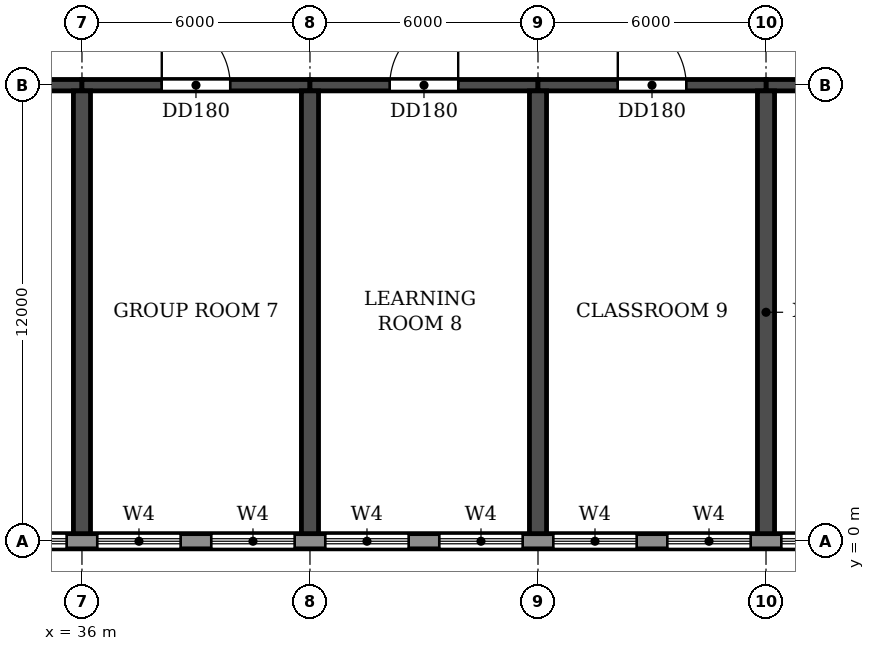
"""IFC4 building model, lengths in metres.
Left out: names, types, materials, properties, quantities, classifications, styles, units other than length and angle.
Written with IfcOpenShell. Run it as: python <this file> out.ifc"""

import sys

from ifc_helpers import new_model, si_unit, direction, frame, frame_2d, origin, place, context, subcontext, project, spatial, rectangle, extrude, element, fill, save


model = new_model("IFC4")
c1 = context("Model", 3, precision=1e-05, world=origin(), true_north=direction((0.0, 1.0)))
c2 = subcontext(c1, "Body", "Model", "MODEL_VIEW")
j1 = project(units=[si_unit("LENGTHUNIT", "METRE"), si_unit("PLANEANGLEUNIT", "RADIAN")], contexts=[c1])
p1 = place(None, origin())
s1 = spatial("IfcSite", under=j1, at=p1, CompositionType="ELEMENT")
p2 = place(p1, origin())
s2 = spatial("IfcBuilding", under=s1, at=p2, CompositionType="ELEMENT")
p3 = place(p2, frame((0.0, 0.0, 15.0)))
s3 = spatial("IfcBuildingStorey", under=s2, at=p3, CompositionType="ELEMENT", Elevation=15.0)
for number, where, z_axis, x_axis in (
    (1, (36.0, 0.2, 0.0), (0.0, 0.0, 1.0), (0.0, 1.0, 0.0)),
    (2, (42.0, 0.2, 0.0), (0.0, 0.0, 1.0), (0.0, 1.0, 0.0)),
    (3, (48.0, 0.2, 0.0), (0.0, 0.0, 1.0), (0.0, 1.0, 0.0)),
    (4, (54.0, 0.2, 0.0), (0.0, 0.0, 1.0), (0.0, 1.0, 0.0)),
):
    element("IfcWall", number, at=place(p3, frame(where, z_axis=z_axis, x_axis=x_axis)), inside=s3, PredefinedType="SHEAR", context=c2, shape_type="SweptSolid", body=[
        extrude(rectangle(XDim=11.65, YDim=0.45, at=frame_2d((5.825, 0.0))), origin(), (0.0, 0.0, 1.0), 3.92),
    ])
p4 = place(p3, frame((30.0, 12.0, 0.0), z_axis=(0.0, 0.0, 1.0), x_axis=(1.0, 0.0, 0.0)))
e5 = element("IfcWall", 5, at=p4, inside=s3, PredefinedType="SHEAR", context=c2, shape_type="SweptSolid", body=[
    extrude(rectangle(XDim=6.0, YDim=0.3, at=frame_2d((3.0, 0.0))), origin(), (0.0, 0.0, 1.0), 3.32),
])
p5 = place(p4, frame((2.1, 0.0, 0.0)))
e6 = element("IfcOpeningElement", 6, at=p5, cuts=e5, PredefinedType="OPENING", context=c2, shape_type="SweptSolid", body=[
    extrude(rectangle(XDim=1.8, YDim=2.1, at=frame_2d((0.9, 1.05))), frame((0.0, 0.16, 0.0), z_axis=(0.0, -1.0, 0.0), x_axis=(1.0, 0.0, 0.0)), (0.0, 0.0, 1.0), 0.32),
])
p6 = place(p3, frame((36.0, 12.0, 0.0), z_axis=(0.0, 0.0, 1.0), x_axis=(1.0, 0.0, 0.0)))
e7 = element("IfcWall", 7, at=p6, inside=s3, PredefinedType="SHEAR", context=c2, shape_type="SweptSolid", body=[
    extrude(rectangle(XDim=6.0, YDim=0.3, at=frame_2d((3.0, 0.0))), origin(), (0.0, 0.0, 1.0), 3.32),
])
p7 = place(p6, frame((2.1, 0.0, 0.0)))
e8 = element("IfcOpeningElement", 8, at=p7, cuts=e7, PredefinedType="OPENING", context=c2, shape_type="SweptSolid", body=[
    extrude(rectangle(XDim=1.8, YDim=2.1, at=frame_2d((0.9, 1.05))), frame((0.0, 0.16, 0.0), z_axis=(0.0, -1.0, 0.0), x_axis=(1.0, 0.0, 0.0)), (0.0, 0.0, 1.0), 0.32),
])
p8 = place(p3, frame((42.0, 12.0, 0.0), z_axis=(0.0, 0.0, 1.0), x_axis=(1.0, 0.0, 0.0)))
e9 = element("IfcWall", 9, at=p8, inside=s3, PredefinedType="SHEAR", context=c2, shape_type="SweptSolid", body=[
    extrude(rectangle(XDim=6.0, YDim=0.3, at=frame_2d((3.0, 0.0))), origin(), (0.0, 0.0, 1.0), 3.32),
])
p9 = place(p8, frame((2.1, 0.0, 0.0)))
e10 = element("IfcOpeningElement", 10, at=p9, cuts=e9, PredefinedType="OPENING", context=c2, shape_type="SweptSolid", body=[
    extrude(rectangle(XDim=1.8, YDim=2.1, at=frame_2d((0.9, 1.05))), frame((0.0, 0.16, 0.0), z_axis=(0.0, -1.0, 0.0), x_axis=(1.0, 0.0, 0.0)), (0.0, 0.0, 1.0), 0.32),
])
p10 = place(p3, frame((48.0, 12.0, 0.0), z_axis=(0.0, 0.0, 1.0), x_axis=(1.0, 0.0, 0.0)))
e11 = element("IfcWall", 11, at=p10, inside=s3, PredefinedType="SHEAR", context=c2, shape_type="SweptSolid", body=[
    extrude(rectangle(XDim=6.0, YDim=0.3, at=frame_2d((3.0, 0.0))), origin(), (0.0, 0.0, 1.0), 3.32),
])
p11 = place(p10, frame((2.1, 0.0, 0.0)))
e12 = element("IfcOpeningElement", 12, at=p11, cuts=e11, PredefinedType="OPENING", context=c2, shape_type="SweptSolid", body=[
    extrude(rectangle(XDim=1.8, YDim=2.1, at=frame_2d((0.9, 1.05))), frame((0.0, 0.16, 0.0), z_axis=(0.0, -1.0, 0.0), x_axis=(1.0, 0.0, 0.0)), (0.0, 0.0, 1.0), 0.32),
])
p12 = place(p3, frame((54.0, 12.0, 0.0), z_axis=(0.0, 0.0, 1.0), x_axis=(1.0, 0.0, 0.0)))
e13 = element("IfcWall", 13, at=p12, inside=s3, PredefinedType="SHEAR", context=c2, shape_type="SweptSolid", body=[
    extrude(rectangle(XDim=6.0, YDim=0.3, at=frame_2d((3.0, 0.0))), origin(), (0.0, 0.0, 1.0), 3.32),
])
p13 = place(p12, frame((2.1, 0.0, 0.0)))
e14 = element("IfcOpeningElement", 14, at=p13, cuts=e13, PredefinedType="OPENING", context=c2, shape_type="SweptSolid", body=[
    extrude(rectangle(XDim=1.8, YDim=2.1, at=frame_2d((0.9, 1.05))), frame((0.0, 0.16, 0.0), z_axis=(0.0, -1.0, 0.0), x_axis=(1.0, 0.0, 0.0)), (0.0, 0.0, 1.0), 0.32),
])
p14 = place(p3, frame((-3.0, 0.0, 0.0), z_axis=(0.0, 0.0, 1.0), x_axis=(1.0, 0.0, 0.0)))
e15 = element("IfcWall", 15, at=p14, inside=s3, PredefinedType="STANDARD", context=c2, shape_type="SweptSolid", body=[
    extrude(rectangle(XDim=108.0, YDim=0.4, at=frame_2d((54.0, 0.0))), origin(), (0.0, 0.0, 1.0), 3.92),
])
p15 = place(p14, frame((3.4, 0.0, 0.9)))
e16 = element("IfcOpeningElement", 16, at=p15, cuts=e15, PredefinedType="OPENING", context=c2, shape_type="SweptSolid", body=[
    extrude(rectangle(XDim=2.2, YDim=2.7, at=frame_2d((1.1, 1.35))), frame((0.0, 0.21, 0.0), z_axis=(0.0, -1.0, 0.0), x_axis=(1.0, 0.0, 0.0)), (0.0, 0.0, 1.0), 0.42),
])
p16 = place(p14, frame((6.4, 0.0, 0.9)))
e17 = element("IfcOpeningElement", 17, at=p16, cuts=e15, PredefinedType="OPENING", context=c2, shape_type="SweptSolid", body=[
    extrude(rectangle(XDim=2.2, YDim=2.7, at=frame_2d((1.1, 1.35))), frame((0.0, 0.21, 0.0), z_axis=(0.0, -1.0, 0.0), x_axis=(1.0, 0.0, 0.0)), (0.0, 0.0, 1.0), 0.42),
])
p17 = place(p14, frame((9.4, 0.0, 0.9)))
e18 = element("IfcOpeningElement", 18, at=p17, cuts=e15, PredefinedType="OPENING", context=c2, shape_type="SweptSolid", body=[
    extrude(rectangle(XDim=2.2, YDim=2.7, at=frame_2d((1.1, 1.35))), frame((0.0, 0.21, 0.0), z_axis=(0.0, -1.0, 0.0), x_axis=(1.0, 0.0, 0.0)), (0.0, 0.0, 1.0), 0.42),
])
p18 = place(p14, frame((12.4, 0.0, 0.9)))
e19 = element("IfcOpeningElement", 19, at=p18, cuts=e15, PredefinedType="OPENING", context=c2, shape_type="SweptSolid", body=[
    extrude(rectangle(XDim=2.2, YDim=2.7, at=frame_2d((1.1, 1.35))), frame((0.0, 0.21, 0.0), z_axis=(0.0, -1.0, 0.0), x_axis=(1.0, 0.0, 0.0)), (0.0, 0.0, 1.0), 0.42),
])
p19 = place(p14, frame((15.4, 0.0, 0.9)))
e20 = element("IfcOpeningElement", 20, at=p19, cuts=e15, PredefinedType="OPENING", context=c2, shape_type="SweptSolid", body=[
    extrude(rectangle(XDim=2.2, YDim=2.7, at=frame_2d((1.1, 1.35))), frame((0.0, 0.21, 0.0), z_axis=(0.0, -1.0, 0.0), x_axis=(1.0, 0.0, 0.0)), (0.0, 0.0, 1.0), 0.42),
])
p20 = place(p14, frame((18.4, 0.0, 0.9)))
e21 = element("IfcOpeningElement", 21, at=p20, cuts=e15, PredefinedType="OPENING", context=c2, shape_type="SweptSolid", body=[
    extrude(rectangle(XDim=2.2, YDim=2.7, at=frame_2d((1.1, 1.35))), frame((0.0, 0.21, 0.0), z_axis=(0.0, -1.0, 0.0), x_axis=(1.0, 0.0, 0.0)), (0.0, 0.0, 1.0), 0.42),
])
p21 = place(p14, frame((21.4, 0.0, 0.9)))
e22 = element("IfcOpeningElement", 22, at=p21, cuts=e15, PredefinedType="OPENING", context=c2, shape_type="SweptSolid", body=[
    extrude(rectangle(XDim=2.2, YDim=2.7, at=frame_2d((1.1, 1.35))), frame((0.0, 0.21, 0.0), z_axis=(0.0, -1.0, 0.0), x_axis=(1.0, 0.0, 0.0)), (0.0, 0.0, 1.0), 0.42),
])
p22 = place(p14, frame((24.4, 0.0, 0.9)))
e23 = element("IfcOpeningElement", 23, at=p22, cuts=e15, PredefinedType="OPENING", context=c2, shape_type="SweptSolid", body=[
    extrude(rectangle(XDim=2.2, YDim=2.7, at=frame_2d((1.1, 1.35))), frame((0.0, 0.21, 0.0), z_axis=(0.0, -1.0, 0.0), x_axis=(1.0, 0.0, 0.0)), (0.0, 0.0, 1.0), 0.42),
])
p23 = place(p14, frame((27.4, 0.0, 0.9)))
e24 = element("IfcOpeningElement", 24, at=p23, cuts=e15, PredefinedType="OPENING", context=c2, shape_type="SweptSolid", body=[
    extrude(rectangle(XDim=2.2, YDim=2.7, at=frame_2d((1.1, 1.35))), frame((0.0, 0.21, 0.0), z_axis=(0.0, -1.0, 0.0), x_axis=(1.0, 0.0, 0.0)), (0.0, 0.0, 1.0), 0.42),
])
p24 = place(p14, frame((30.4, 0.0, 0.9)))
e25 = element("IfcOpeningElement", 25, at=p24, cuts=e15, PredefinedType="OPENING", context=c2, shape_type="SweptSolid", body=[
    extrude(rectangle(XDim=2.2, YDim=2.7, at=frame_2d((1.1, 1.35))), frame((0.0, 0.21, 0.0), z_axis=(0.0, -1.0, 0.0), x_axis=(1.0, 0.0, 0.0)), (0.0, 0.0, 1.0), 0.42),
])
p25 = place(p14, frame((33.4, 0.0, 0.9)))
e26 = element("IfcOpeningElement", 26, at=p25, cuts=e15, PredefinedType="OPENING", context=c2, shape_type="SweptSolid", body=[
    extrude(rectangle(XDim=2.2, YDim=2.7, at=frame_2d((1.1, 1.35))), frame((0.0, 0.21, 0.0), z_axis=(0.0, -1.0, 0.0), x_axis=(1.0, 0.0, 0.0)), (0.0, 0.0, 1.0), 0.42),
])
p26 = place(p14, frame((36.4, 0.0, 0.9)))
e27 = element("IfcOpeningElement", 27, at=p26, cuts=e15, PredefinedType="OPENING", context=c2, shape_type="SweptSolid", body=[
    extrude(rectangle(XDim=2.2, YDim=2.7, at=frame_2d((1.1, 1.35))), frame((0.0, 0.21, 0.0), z_axis=(0.0, -1.0, 0.0), x_axis=(1.0, 0.0, 0.0)), (0.0, 0.0, 1.0), 0.42),
])
p27 = place(p14, frame((39.4, 0.0, 0.9)))
e28 = element("IfcOpeningElement", 28, at=p27, cuts=e15, PredefinedType="OPENING", context=c2, shape_type="SweptSolid", body=[
    extrude(rectangle(XDim=2.2, YDim=2.7, at=frame_2d((1.1, 1.35))), frame((0.0, 0.21, 0.0), z_axis=(0.0, -1.0, 0.0), x_axis=(1.0, 0.0, 0.0)), (0.0, 0.0, 1.0), 0.42),
])
p28 = place(p14, frame((42.4, 0.0, 0.9)))
e29 = element("IfcOpeningElement", 29, at=p28, cuts=e15, PredefinedType="OPENING", context=c2, shape_type="SweptSolid", body=[
    extrude(rectangle(XDim=2.2, YDim=2.7, at=frame_2d((1.1, 1.35))), frame((0.0, 0.21, 0.0), z_axis=(0.0, -1.0, 0.0), x_axis=(1.0, 0.0, 0.0)), (0.0, 0.0, 1.0), 0.42),
])
p29 = place(p14, frame((45.4, 0.0, 0.9)))
e30 = element("IfcOpeningElement", 30, at=p29, cuts=e15, PredefinedType="OPENING", context=c2, shape_type="SweptSolid", body=[
    extrude(rectangle(XDim=2.2, YDim=2.7, at=frame_2d((1.1, 1.35))), frame((0.0, 0.21, 0.0), z_axis=(0.0, -1.0, 0.0), x_axis=(1.0, 0.0, 0.0)), (0.0, 0.0, 1.0), 0.42),
])
p30 = place(p14, frame((48.4, 0.0, 0.9)))
e31 = element("IfcOpeningElement", 31, at=p30, cuts=e15, PredefinedType="OPENING", context=c2, shape_type="SweptSolid", body=[
    extrude(rectangle(XDim=2.2, YDim=2.7, at=frame_2d((1.1, 1.35))), frame((0.0, 0.21, 0.0), z_axis=(0.0, -1.0, 0.0), x_axis=(1.0, 0.0, 0.0)), (0.0, 0.0, 1.0), 0.42),
])
p31 = place(p14, frame((51.4, 0.0, 0.9)))
e32 = element("IfcOpeningElement", 32, at=p31, cuts=e15, PredefinedType="OPENING", context=c2, shape_type="SweptSolid", body=[
    extrude(rectangle(XDim=2.2, YDim=2.7, at=frame_2d((1.1, 1.35))), frame((0.0, 0.21, 0.0), z_axis=(0.0, -1.0, 0.0), x_axis=(1.0, 0.0, 0.0)), (0.0, 0.0, 1.0), 0.42),
])
p32 = place(p14, frame((54.4, 0.0, 0.9)))
e33 = element("IfcOpeningElement", 33, at=p32, cuts=e15, PredefinedType="OPENING", context=c2, shape_type="SweptSolid", body=[
    extrude(rectangle(XDim=2.2, YDim=2.7, at=frame_2d((1.1, 1.35))), frame((0.0, 0.21, 0.0), z_axis=(0.0, -1.0, 0.0), x_axis=(1.0, 0.0, 0.0)), (0.0, 0.0, 1.0), 0.42),
])
p33 = place(p14, frame((57.4, 0.0, 0.9)))
e34 = element("IfcOpeningElement", 34, at=p33, cuts=e15, PredefinedType="OPENING", context=c2, shape_type="SweptSolid", body=[
    extrude(rectangle(XDim=2.2, YDim=2.7, at=frame_2d((1.1, 1.35))), frame((0.0, 0.21, 0.0), z_axis=(0.0, -1.0, 0.0), x_axis=(1.0, 0.0, 0.0)), (0.0, 0.0, 1.0), 0.42),
])
p34 = place(p14, frame((60.4, 0.0, 0.9)))
e35 = element("IfcOpeningElement", 35, at=p34, cuts=e15, PredefinedType="OPENING", context=c2, shape_type="SweptSolid", body=[
    extrude(rectangle(XDim=2.2, YDim=2.7, at=frame_2d((1.1, 1.35))), frame((0.0, 0.21, 0.0), z_axis=(0.0, -1.0, 0.0), x_axis=(1.0, 0.0, 0.0)), (0.0, 0.0, 1.0), 0.42),
])
p35 = place(p14, frame((63.4, 0.0, 0.9)))
e36 = element("IfcOpeningElement", 36, at=p35, cuts=e15, PredefinedType="OPENING", context=c2, shape_type="SweptSolid", body=[
    extrude(rectangle(XDim=2.2, YDim=2.7, at=frame_2d((1.1, 1.35))), frame((0.0, 0.21, 0.0), z_axis=(0.0, -1.0, 0.0), x_axis=(1.0, 0.0, 0.0)), (0.0, 0.0, 1.0), 0.42),
])
p36 = place(p14, frame((66.4, 0.0, 0.9)))
e37 = element("IfcOpeningElement", 37, at=p36, cuts=e15, PredefinedType="OPENING", context=c2, shape_type="SweptSolid", body=[
    extrude(rectangle(XDim=2.2, YDim=2.7, at=frame_2d((1.1, 1.35))), frame((0.0, 0.21, 0.0), z_axis=(0.0, -1.0, 0.0), x_axis=(1.0, 0.0, 0.0)), (0.0, 0.0, 1.0), 0.42),
])
p37 = place(p14, frame((69.4, 0.0, 0.9)))
e38 = element("IfcOpeningElement", 38, at=p37, cuts=e15, PredefinedType="OPENING", context=c2, shape_type="SweptSolid", body=[
    extrude(rectangle(XDim=2.2, YDim=2.7, at=frame_2d((1.1, 1.35))), frame((0.0, 0.21, 0.0), z_axis=(0.0, -1.0, 0.0), x_axis=(1.0, 0.0, 0.0)), (0.0, 0.0, 1.0), 0.42),
])
p38 = place(p14, frame((72.4, 0.0, 0.9)))
e39 = element("IfcOpeningElement", 39, at=p38, cuts=e15, PredefinedType="OPENING", context=c2, shape_type="SweptSolid", body=[
    extrude(rectangle(XDim=2.2, YDim=2.7, at=frame_2d((1.1, 1.35))), frame((0.0, 0.21, 0.0), z_axis=(0.0, -1.0, 0.0), x_axis=(1.0, 0.0, 0.0)), (0.0, 0.0, 1.0), 0.42),
])
p39 = place(p14, frame((75.4, 0.0, 0.9)))
e40 = element("IfcOpeningElement", 40, at=p39, cuts=e15, PredefinedType="OPENING", context=c2, shape_type="SweptSolid", body=[
    extrude(rectangle(XDim=2.2, YDim=2.7, at=frame_2d((1.1, 1.35))), frame((0.0, 0.21, 0.0), z_axis=(0.0, -1.0, 0.0), x_axis=(1.0, 0.0, 0.0)), (0.0, 0.0, 1.0), 0.42),
])
p40 = place(p14, frame((78.4, 0.0, 0.9)))
e41 = element("IfcOpeningElement", 41, at=p40, cuts=e15, PredefinedType="OPENING", context=c2, shape_type="SweptSolid", body=[
    extrude(rectangle(XDim=2.2, YDim=2.7, at=frame_2d((1.1, 1.35))), frame((0.0, 0.21, 0.0), z_axis=(0.0, -1.0, 0.0), x_axis=(1.0, 0.0, 0.0)), (0.0, 0.0, 1.0), 0.42),
])
p41 = place(p14, frame((81.4, 0.0, 0.9)))
e42 = element("IfcOpeningElement", 42, at=p41, cuts=e15, PredefinedType="OPENING", context=c2, shape_type="SweptSolid", body=[
    extrude(rectangle(XDim=2.2, YDim=2.7, at=frame_2d((1.1, 1.35))), frame((0.0, 0.21, 0.0), z_axis=(0.0, -1.0, 0.0), x_axis=(1.0, 0.0, 0.0)), (0.0, 0.0, 1.0), 0.42),
])
p42 = place(p14, frame((84.4, 0.0, 0.9)))
e43 = element("IfcOpeningElement", 43, at=p42, cuts=e15, PredefinedType="OPENING", context=c2, shape_type="SweptSolid", body=[
    extrude(rectangle(XDim=2.2, YDim=2.7, at=frame_2d((1.1, 1.35))), frame((0.0, 0.21, 0.0), z_axis=(0.0, -1.0, 0.0), x_axis=(1.0, 0.0, 0.0)), (0.0, 0.0, 1.0), 0.42),
])
p43 = place(p14, frame((87.4, 0.0, 0.9)))
e44 = element("IfcOpeningElement", 44, at=p43, cuts=e15, PredefinedType="OPENING", context=c2, shape_type="SweptSolid", body=[
    extrude(rectangle(XDim=2.2, YDim=2.7, at=frame_2d((1.1, 1.35))), frame((0.0, 0.21, 0.0), z_axis=(0.0, -1.0, 0.0), x_axis=(1.0, 0.0, 0.0)), (0.0, 0.0, 1.0), 0.42),
])
p44 = place(p14, frame((90.4, 0.0, 0.9)))
e45 = element("IfcOpeningElement", 45, at=p44, cuts=e15, PredefinedType="OPENING", context=c2, shape_type="SweptSolid", body=[
    extrude(rectangle(XDim=2.2, YDim=2.7, at=frame_2d((1.1, 1.35))), frame((0.0, 0.21, 0.0), z_axis=(0.0, -1.0, 0.0), x_axis=(1.0, 0.0, 0.0)), (0.0, 0.0, 1.0), 0.42),
])
p45 = place(p14, frame((93.4, 0.0, 0.9)))
e46 = element("IfcOpeningElement", 46, at=p45, cuts=e15, PredefinedType="OPENING", context=c2, shape_type="SweptSolid", body=[
    extrude(rectangle(XDim=2.2, YDim=2.7, at=frame_2d((1.1, 1.35))), frame((0.0, 0.21, 0.0), z_axis=(0.0, -1.0, 0.0), x_axis=(1.0, 0.0, 0.0)), (0.0, 0.0, 1.0), 0.42),
])
p46 = place(p14, frame((96.4, 0.0, 0.9)))
e47 = element("IfcOpeningElement", 47, at=p46, cuts=e15, PredefinedType="OPENING", context=c2, shape_type="SweptSolid", body=[
    extrude(rectangle(XDim=2.2, YDim=2.7, at=frame_2d((1.1, 1.35))), frame((0.0, 0.21, 0.0), z_axis=(0.0, -1.0, 0.0), x_axis=(1.0, 0.0, 0.0)), (0.0, 0.0, 1.0), 0.42),
])
p47 = place(p14, frame((99.4, 0.0, 0.9)))
e48 = element("IfcOpeningElement", 48, at=p47, cuts=e15, PredefinedType="OPENING", context=c2, shape_type="SweptSolid", body=[
    extrude(rectangle(XDim=2.2, YDim=2.7, at=frame_2d((1.1, 1.35))), frame((0.0, 0.21, 0.0), z_axis=(0.0, -1.0, 0.0), x_axis=(1.0, 0.0, 0.0)), (0.0, 0.0, 1.0), 0.42),
])
p48 = place(p14, frame((102.4, 0.0, 0.9)))
e49 = element("IfcOpeningElement", 49, at=p48, cuts=e15, PredefinedType="OPENING", context=c2, shape_type="SweptSolid", body=[
    extrude(rectangle(XDim=2.2, YDim=2.7, at=frame_2d((1.1, 1.35))), frame((0.0, 0.21, 0.0), z_axis=(0.0, -1.0, 0.0), x_axis=(1.0, 0.0, 0.0)), (0.0, 0.0, 1.0), 0.42),
])
p49 = place(p26, origin())
e50 = element("IfcWindow", 50, at=p49, inside=s3, PartitioningType="DOUBLE_PANEL_HORIZONTAL", PredefinedType="WINDOW", context=c2, shape_type="SweptSolid", body=[
    extrude(rectangle(XDim=2.2, YDim=2.7, at=frame_2d((1.1, 1.35))), frame((0.0, 0.03, 0.0), z_axis=(0.0, -1.0, 0.0), x_axis=(1.0, 0.0, 0.0)), (0.0, 0.0, 1.0), 0.06),
])
fill(e27, e50)
p50 = place(p27, origin())
e51 = element("IfcWindow", 51, at=p50, inside=s3, PartitioningType="DOUBLE_PANEL_HORIZONTAL", PredefinedType="WINDOW", context=c2, shape_type="SweptSolid", body=[
    extrude(rectangle(XDim=2.2, YDim=2.7, at=frame_2d((1.1, 1.35))), frame((0.0, 0.03, 0.0), z_axis=(0.0, -1.0, 0.0), x_axis=(1.0, 0.0, 0.0)), (0.0, 0.0, 1.0), 0.06),
])
fill(e28, e51)
p51 = place(p28, origin())
e52 = element("IfcWindow", 52, at=p51, inside=s3, PartitioningType="DOUBLE_PANEL_HORIZONTAL", PredefinedType="WINDOW", context=c2, shape_type="SweptSolid", body=[
    extrude(rectangle(XDim=2.2, YDim=2.7, at=frame_2d((1.1, 1.35))), frame((0.0, 0.03, 0.0), z_axis=(0.0, -1.0, 0.0), x_axis=(1.0, 0.0, 0.0)), (0.0, 0.0, 1.0), 0.06),
])
fill(e29, e52)
p52 = place(p29, origin())
e53 = element("IfcWindow", 53, at=p52, inside=s3, PartitioningType="DOUBLE_PANEL_HORIZONTAL", PredefinedType="WINDOW", context=c2, shape_type="SweptSolid", body=[
    extrude(rectangle(XDim=2.2, YDim=2.7, at=frame_2d((1.1, 1.35))), frame((0.0, 0.03, 0.0), z_axis=(0.0, -1.0, 0.0), x_axis=(1.0, 0.0, 0.0)), (0.0, 0.0, 1.0), 0.06),
])
fill(e30, e53)
p53 = place(p30, origin())
e54 = element("IfcWindow", 54, at=p53, inside=s3, PartitioningType="DOUBLE_PANEL_HORIZONTAL", PredefinedType="WINDOW", context=c2, shape_type="SweptSolid", body=[
    extrude(rectangle(XDim=2.2, YDim=2.7, at=frame_2d((1.1, 1.35))), frame((0.0, 0.03, 0.0), z_axis=(0.0, -1.0, 0.0), x_axis=(1.0, 0.0, 0.0)), (0.0, 0.0, 1.0), 0.06),
])
fill(e31, e54)
p54 = place(p31, origin())
e55 = element("IfcWindow", 55, at=p54, inside=s3, PartitioningType="DOUBLE_PANEL_HORIZONTAL", PredefinedType="WINDOW", context=c2, shape_type="SweptSolid", body=[
    extrude(rectangle(XDim=2.2, YDim=2.7, at=frame_2d((1.1, 1.35))), frame((0.0, 0.03, 0.0), z_axis=(0.0, -1.0, 0.0), x_axis=(1.0, 0.0, 0.0)), (0.0, 0.0, 1.0), 0.06),
])
fill(e32, e55)
p55 = place(p32, origin())
e56 = element("IfcWindow", 56, at=p55, inside=s3, PartitioningType="DOUBLE_PANEL_HORIZONTAL", PredefinedType="WINDOW", context=c2, shape_type="SweptSolid", body=[
    extrude(rectangle(XDim=2.2, YDim=2.7, at=frame_2d((1.1, 1.35))), frame((0.0, 0.03, 0.0), z_axis=(0.0, -1.0, 0.0), x_axis=(1.0, 0.0, 0.0)), (0.0, 0.0, 1.0), 0.06),
])
fill(e33, e56)
p56 = place(p33, origin())
e57 = element("IfcWindow", 57, at=p56, inside=s3, PartitioningType="DOUBLE_PANEL_HORIZONTAL", PredefinedType="WINDOW", context=c2, shape_type="SweptSolid", body=[
    extrude(rectangle(XDim=2.2, YDim=2.7, at=frame_2d((1.1, 1.35))), frame((0.0, 0.03, 0.0), z_axis=(0.0, -1.0, 0.0), x_axis=(1.0, 0.0, 0.0)), (0.0, 0.0, 1.0), 0.06),
])
fill(e34, e57)
p57 = place(p7, origin())
e58 = element("IfcDoor", 58, at=p57, inside=s3, OperationType="DOUBLE_DOOR_SINGLE_SWING", PredefinedType="DOOR", context=c2, shape_type="SweptSolid", body=[
    extrude(rectangle(XDim=1.8, YDim=2.1, at=frame_2d((0.9, 1.05))), frame((0.0, 0.025, 0.0), z_axis=(0.0, -1.0, 0.0), x_axis=(1.0, 0.0, 0.0)), (0.0, 0.0, 1.0), 0.05),
])
fill(e8, e58)
p58 = place(p9, origin())
e59 = element("IfcDoor", 59, at=p58, inside=s3, OperationType="DOUBLE_DOOR_SINGLE_SWING", PredefinedType="DOOR", context=c2, shape_type="SweptSolid", body=[
    extrude(rectangle(XDim=1.8, YDim=2.1, at=frame_2d((0.9, 1.05))), frame((0.0, 0.025, 0.0), z_axis=(0.0, -1.0, 0.0), x_axis=(1.0, 0.0, 0.0)), (0.0, 0.0, 1.0), 0.05),
])
fill(e10, e59)
p59 = place(p11, origin())
e60 = element("IfcDoor", 60, at=p59, inside=s3, OperationType="DOUBLE_DOOR_SINGLE_SWING", PredefinedType="DOOR", context=c2, shape_type="SweptSolid", body=[
    extrude(rectangle(XDim=1.8, YDim=2.1, at=frame_2d((0.9, 1.05))), frame((0.0, 0.025, 0.0), z_axis=(0.0, -1.0, 0.0), x_axis=(1.0, 0.0, 0.0)), (0.0, 0.0, 1.0), 0.05),
])
fill(e12, e60)
save(model, sys.argv[1])
